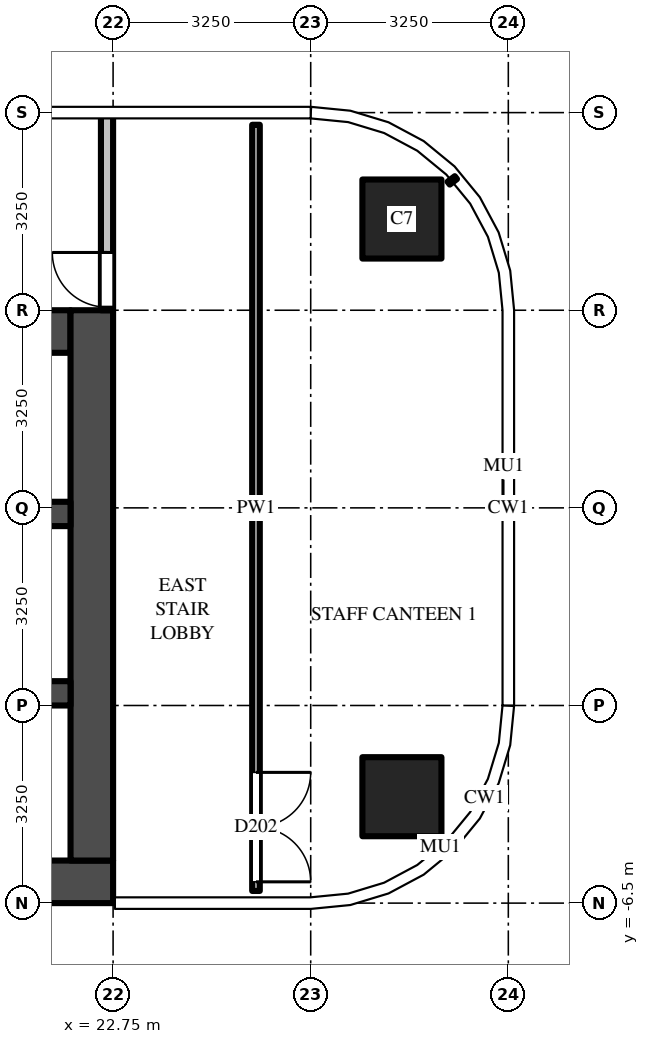
"""IFC4 building model, lengths in metres.
Left out: names, types, materials, properties, quantities, classifications, styles, units other than length and angle.
Written with IfcOpenShell. Run it as: python <this file> out.ifc"""

import sys

from ifc_helpers import new_model, si_unit, direction, frame, frame_2d, origin, origin_2d, place, context, subcontext, project, spatial, rectangle, extrude, source, transform, mapped, element, fill, save


model = new_model("IFC4")
c1 = context("Model", 3, precision=1e-05, world=origin(), true_north=direction((0.0, 1.0)))
c2 = subcontext(c1, "Body", "Model", "MODEL_VIEW")
j1 = project(units=[si_unit("LENGTHUNIT", "METRE"), si_unit("PLANEANGLEUNIT", "RADIAN")], contexts=[c1])
p1 = place(None, origin())
s1 = spatial("IfcSite", under=j1, at=p1, CompositionType="ELEMENT")
p2 = place(p1, origin())
s2 = spatial("IfcBuilding", under=s1, at=p2, CompositionType="ELEMENT")
p3 = place(p2, frame((0.0, 0.0, 120.0)))
s3 = spatial("IfcBuildingStorey", under=s2, at=p3, CompositionType="ELEMENT", Elevation=120.0)
m1 = source(origin(), c2, "Body", "SweptSolid", [
    extrude(rectangle(XDim=1.3, YDim=1.3, at=origin_2d()), origin(), (0.0, 0.0, 1.0), 4.5),
])
for number, where, z_axis, x_axis in (
    (1, (27.5, 4.75, 0.0), (0.0, 0.0, 1.0), (1.0, 0.0, 0.0)),
    (2, (27.5, -4.75, 0.0), (0.0, 0.0, 1.0), (1.0, 0.0, 0.0)),
):
    element("IfcColumn", number, at=place(p3, frame(where, z_axis=z_axis, x_axis=x_axis)), inside=s3, PredefinedType="COLUMN", context=c2, shape_type="MappedRepresentation", body=[
        mapped(m1, transform((0.0, 0.0, 0.0))),
    ])
m2 = source(origin(), c2, "Body", "SweptSolid", [
    extrude(rectangle(XDim=16.5, YDim=0.7, at=frame_2d((8.25, 0.0))), origin(), (0.0, 0.0, 1.0), 4.25),
])
p4 = place(p3, frame((6.25, -6.15, 0.0), z_axis=(0.0, 0.0, 1.0), x_axis=(1.0, 0.0, 0.0)))
e3 = element("IfcWall", 3, at=p4, inside=s3, PredefinedType="SHEAR", context=c2, shape_type="MappedRepresentation", body=[
    mapped(m2, transform((0.0, 0.0, 0.0))),
])
m3 = source(origin(), c2, "Body", "SweptSolid", [
    extrude(rectangle(XDim=14.85, YDim=0.7, at=frame_2d((7.425, 0.0))), origin(), (0.0, 0.0, 1.0), 4.25),
])
p5 = place(p3, frame((7.2, 2.9, 0.0), z_axis=(0.0, 0.0, 1.0), x_axis=(1.0, 0.0, 0.0)))
e4 = element("IfcWall", 4, at=p5, inside=s3, PredefinedType="SHEAR", context=c2, shape_type="MappedRepresentation", body=[
    mapped(m3, transform((0.0, 0.0, 0.0))),
])
m4 = source(origin(), c2, "Body", "SweptSolid", [
    extrude(rectangle(XDim=1.3, YDim=2.1, at=frame_2d((0.65, 1.05))), frame((0.0, 0.36, 0.0), z_axis=(0.0, -1.0, 0.0), x_axis=(1.0, 0.0, 0.0)), (0.0, 0.0, 1.0), 0.72),
])
p6 = place(p5, frame((12.2, 0.0, 0.0)))
e5 = element("IfcOpeningElement", 5, at=p6, cuts=e4, PredefinedType="OPENING", context=c2, shape_type="MappedRepresentation", body=[
    mapped(m4, transform((0.0, 0.0, 0.0))),
])
m5 = source(origin(), c2, "Body", "SweptSolid", [
    extrude(rectangle(XDim=1.2, YDim=2.1, at=frame_2d((0.6, 1.05))), frame((0.0, 0.36, 0.0), z_axis=(0.0, -1.0, 0.0), x_axis=(1.0, 0.0, 0.0)), (0.0, 0.0, 1.0), 0.72),
])
p7 = place(p5, frame((9.85, 0.0, 0.0)))
e6 = element("IfcOpeningElement", 6, at=p7, cuts=e4, PredefinedType="OPENING", context=c2, shape_type="MappedRepresentation", body=[
    mapped(m5, transform((0.0, 0.0, 0.0))),
])
m6 = source(origin(), c2, "Body", "SweptSolid", [
    extrude(rectangle(XDim=1.0, YDim=2.1, at=frame_2d((0.5, 1.05))), frame((0.0, 0.36, 0.0), z_axis=(0.0, -1.0, 0.0), x_axis=(1.0, 0.0, 0.0)), (0.0, 0.0, 1.0), 0.72),
])
p8 = place(p5, frame((7.9, 0.0, 0.0)))
e7 = element("IfcOpeningElement", 7, at=p8, cuts=e4, PredefinedType="OPENING", context=c2, shape_type="MappedRepresentation", body=[
    mapped(m6, transform((0.0, 0.0, 0.0))),
])
m7 = source(origin(), c2, "Body", "SweptSolid", [
    extrude(rectangle(XDim=0.8, YDim=2.1, at=frame_2d((0.4, 1.05))), frame((0.0, 0.36, 0.0), z_axis=(0.0, -1.0, 0.0), x_axis=(1.0, 0.0, 0.0)), (0.0, 0.0, 1.0), 0.72),
])
p9 = place(p5, frame((0.113, 0.0, 0.0)))
e8 = element("IfcOpeningElement", 8, at=p9, cuts=e4, PredefinedType="OPENING", context=c2, shape_type="MappedRepresentation", body=[
    mapped(m7, transform((0.0, 0.0, 0.0))),
])
p10 = place(p5, frame((1.288, 0.0, 0.0)))
e9 = element("IfcOpeningElement", 9, at=p10, cuts=e4, PredefinedType="OPENING", context=c2, shape_type="MappedRepresentation", body=[
    mapped(m7, transform((0.0, 0.0, 0.0))),
])
p11 = place(p5, frame((2.712, 0.0, 0.0)))
e10 = element("IfcOpeningElement", 10, at=p11, cuts=e4, PredefinedType="OPENING", context=c2, shape_type="MappedRepresentation", body=[
    mapped(m7, transform((0.0, 0.0, 0.0))),
])
p12 = place(p5, frame((3.887, 0.0, 0.0)))
e11 = element("IfcOpeningElement", 11, at=p12, cuts=e4, PredefinedType="OPENING", context=c2, shape_type="MappedRepresentation", body=[
    mapped(m7, transform((0.0, 0.0, 0.0))),
])
p13 = place(p5, frame((5.312, 0.0, 0.0)))
e12 = element("IfcOpeningElement", 12, at=p13, cuts=e4, PredefinedType="OPENING", context=c2, shape_type="MappedRepresentation", body=[
    mapped(m7, transform((0.0, 0.0, 0.0))),
])
p14 = place(p5, frame((6.488, 0.0, 0.0)))
e13 = element("IfcOpeningElement", 13, at=p14, cuts=e4, PredefinedType="OPENING", context=c2, shape_type="MappedRepresentation", body=[
    mapped(m7, transform((0.0, 0.0, 0.0))),
])
m8 = source(origin(), c2, "Body", "SweptSolid", [
    extrude(rectangle(XDim=9.05, YDim=0.7, at=frame_2d((4.525, 0.0))), origin(), (0.0, 0.0, 1.0), 4.25),
])
p15 = place(p3, frame((22.4, -5.8, 0.0), z_axis=(0.0, 0.0, 1.0), x_axis=(0.0, 1.0, 0.0)))
e14 = element("IfcWall", 14, at=p15, inside=s3, PredefinedType="SHEAR", context=c2, shape_type="MappedRepresentation", body=[
    mapped(m8, transform((0.0, 0.0, 0.0))),
])
m9 = source(origin(), c2, "Body", "SweptSolid", [
    extrude(rectangle(XDim=14.85, YDim=0.4, at=frame_2d((7.425, 0.0))), origin(), (0.0, 0.0, 1.0), 4.25),
])
p16 = place(p3, frame((7.2, -0.1, 0.0), z_axis=(0.0, 0.0, 1.0), x_axis=(1.0, 0.0, 0.0)))
e15 = element("IfcWall", 15, at=p16, inside=s3, PredefinedType="SHEAR", context=c2, shape_type="MappedRepresentation", body=[
    mapped(m9, transform((0.0, 0.0, 0.0))),
])
m10 = source(origin(), c2, "Body", "SweptSolid", [
    extrude(rectangle(XDim=1.0, YDim=2.1, at=frame_2d((0.5, 1.05))), frame((0.0, 0.21, 0.0), z_axis=(0.0, -1.0, 0.0), x_axis=(1.0, 0.0, 0.0)), (0.0, 0.0, 1.0), 0.42),
])
p17 = place(p16, frame((7.9, 0.0, 0.0)))
e16 = element("IfcOpeningElement", 16, at=p17, cuts=e15, PredefinedType="OPENING", context=c2, shape_type="MappedRepresentation", body=[
    mapped(m10, transform((0.0, 0.0, 0.0))),
])
m11 = source(origin(), c2, "Body", "SweptSolid", [
    extrude(rectangle(XDim=5.7, YDim=0.4, at=frame_2d((2.85, 0.0))), origin(), (0.0, 0.0, 1.0), 4.25),
])
p18 = place(p3, frame((16.35, -3.05, 0.0), z_axis=(0.0, 0.0, 1.0), x_axis=(1.0, 0.0, 0.0)))
e17 = element("IfcWall", 17, at=p18, inside=s3, PredefinedType="SHEAR", context=c2, shape_type="MappedRepresentation", body=[
    mapped(m11, transform((0.0, 0.0, 0.0))),
])
m12 = source(origin(), c2, "Body", "SweptSolid", [
    extrude(rectangle(XDim=3.25, YDim=0.2, at=frame_2d((1.625, 0.0))), origin(), (0.0, 0.0, 1.0), 4.25),
])
p19 = place(p3, frame((22.65, 3.25, 0.0), z_axis=(0.0, 0.0, 1.0), x_axis=(0.0, 1.0, 0.0)))
e18 = element("IfcWall", 18, at=p19, inside=s3, PredefinedType="PARTITIONING", context=c2, shape_type="MappedRepresentation", body=[
    mapped(m12, transform((0.0, 0.0, 0.0))),
])
m13 = source(origin(), c2, "Body", "SweptSolid", [
    extrude(rectangle(XDim=0.9, YDim=2.1, at=frame_2d((0.45, 1.05))), frame((0.0, 0.11, 0.0), z_axis=(0.0, -1.0, 0.0), x_axis=(1.0, 0.0, 0.0)), (0.0, 0.0, 1.0), 0.22),
])
p20 = place(p19, frame((0.05, 0.0, 0.0)))
e19 = element("IfcOpeningElement", 19, at=p20, cuts=e18, PredefinedType="OPENING", context=c2, shape_type="MappedRepresentation", body=[
    mapped(m13, transform((0.0, 0.0, 0.0))),
])
m14 = source(origin(), c2, "Body", "SweptSolid", [
    extrude(rectangle(XDim=12.6, YDim=0.125, at=frame_2d((6.3, 0.0))), origin(), (0.0, 0.0, 1.0), 3.33),
])
p21 = place(p3, frame((25.1, 6.3, 0.0), z_axis=(0.0, 0.0, 1.0), x_axis=(0.0, -1.0, 0.0)))
e20 = element("IfcWall", 20, at=p21, inside=s3, PredefinedType="PARTITIONING", context=c2, shape_type="MappedRepresentation", body=[
    mapped(m14, transform((0.0, 0.0, 0.0))),
])
m15 = source(origin(), c2, "Body", "SweptSolid", [
    extrude(rectangle(XDim=1.8, YDim=2.1, at=frame_2d((0.9, 1.05))), frame((0.0, 0.073, 0.0), z_axis=(0.0, -1.0, 0.0), x_axis=(1.0, 0.0, 0.0)), (0.0, 0.0, 1.0), 0.145),
])
p22 = place(p21, frame((10.65, 0.0, 0.0)))
e21 = element("IfcOpeningElement", 21, at=p22, cuts=e20, PredefinedType="OPENING", context=c2, shape_type="MappedRepresentation", body=[
    mapped(m15, transform((0.0, 0.0, 0.0))),
])
m16 = source(origin(), c2, "Body", "SweptSolid", [
    extrude(rectangle(XDim=0.9, YDim=2.1, at=frame_2d((0.45, 1.05))), frame((0.0, 0.025, 0.0), z_axis=(0.0, -1.0, 0.0), x_axis=(1.0, 0.0, 0.0)), (0.0, 0.0, 1.0), 0.05),
])
p23 = place(p20, origin())
e22 = element("IfcDoor", 22, at=p23, inside=s3, OperationType="SINGLE_SWING_RIGHT", PredefinedType="DOOR", context=c2, shape_type="MappedRepresentation", body=[
    mapped(m16, transform((0.0, 0.0, 0.0))),
])
fill(e19, e22)
m17 = source(origin(), c2, "Body", "SweptSolid", [
    extrude(rectangle(XDim=1.8, YDim=2.1, at=frame_2d((0.9, 1.05))), frame((0.0, 0.025, 0.0), z_axis=(0.0, -1.0, 0.0), x_axis=(1.0, 0.0, 0.0)), (0.0, 0.0, 1.0), 0.05),
])
p24 = place(p22, origin())
e23 = element("IfcDoor", 23, at=p24, inside=s3, OperationType="DOUBLE_DOOR_SINGLE_SWING", PredefinedType="DOOR", context=c2, shape_type="MappedRepresentation", body=[
    mapped(m17, transform((0.0, 0.0, 0.0))),
])
fill(e21, e23)
save(model, sys.argv[1])
